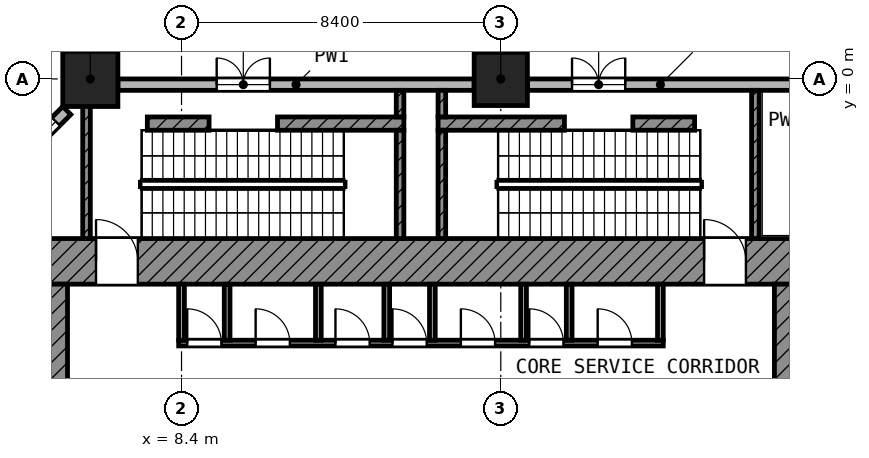
"""IFC4 building model, lengths in metres.
Left out: names, types, materials, properties, quantities, classifications, styles, units other than length and angle.
Written with IfcOpenShell. Run it as: python <this file> out.ifc"""

import sys

from ifc_helpers import new_model, si_unit, direction, frame, frame_2d, origin, origin_2d, place, context, subcontext, project, spatial, rectangle, extrude, element, fill, save


model = new_model("IFC4")
c1 = context("Model", 3, precision=1e-05, world=origin(), true_north=direction((0.0, 1.0)))
c2 = subcontext(c1, "Body", "Model", "MODEL_VIEW")
j1 = project(units=[si_unit("LENGTHUNIT", "METRE"), si_unit("PLANEANGLEUNIT", "RADIAN")], contexts=[c1])
p1 = place(None, origin())
s1 = spatial("IfcSite", under=j1, at=p1, CompositionType="ELEMENT")
p2 = place(p1, origin())
s2 = spatial("IfcBuilding", under=s1, at=p2, CompositionType="ELEMENT")
p3 = place(p2, origin())
s3 = spatial("IfcBuildingStorey", under=s2, at=p3, CompositionType="ELEMENT", Elevation=0.0)
p4 = place(p3, frame((6.0, 0.0, 0.0), z_axis=(0.0, 0.0, 1.0), x_axis=(1.0, 0.0, 0.0)))
e1 = element("IfcColumn", 1, at=p4, inside=s3, PredefinedType="COLUMN", context=c2, shape_type="SweptSolid", body=[
    extrude(rectangle(XDim=1.45, YDim=1.45, at=origin_2d()), origin(), (0.0, 0.0, 1.0), 7.0),
])
p5 = place(p3, frame((16.8, 0.0, 0.0), z_axis=(0.0, 0.0, 1.0), x_axis=(1.0, 0.0, 0.0)))
e2 = element("IfcColumn", 2, at=p5, inside=s3, PredefinedType="COLUMN", context=c2, shape_type="SweptSolid", body=[
    extrude(rectangle(XDim=1.4, YDim=1.4, at=origin_2d()), origin(), (0.0, 0.0, 1.0), 7.0),
])
p6 = place(p3, frame((24.5, -0.15, 0.0), z_axis=(0.0, 0.0, 1.0), x_axis=(-1.0, 0.0, 0.0)))
e3 = element("IfcWall", 3, at=p6, inside=s3, PredefinedType="SOLIDWALL", context=c2, shape_type="SweptSolid", body=[
    extrude(rectangle(XDim=7.0, YDim=0.3, at=frame_2d((3.5, 0.0))), origin(), (0.0, 0.0, 1.0), 5.25),
])
p7 = place(p6, frame((4.425, 0.0, 0.0)))
e4 = element("IfcOpeningElement", 4, at=p7, cuts=e3, PredefinedType="OPENING", context=c2, shape_type="SweptSolid", body=[
    extrude(rectangle(XDim=1.4, YDim=2.1, at=frame_2d((0.7, 1.05))), frame((0.0, 0.16, 0.0), z_axis=(0.0, -1.0, 0.0), x_axis=(1.0, 0.0, 0.0)), (0.0, 0.0, 1.0), 0.32),
])
p8 = place(p3, frame((16.1, -0.15, 0.0), z_axis=(0.0, 0.0, 1.0), x_axis=(-1.0, 0.0, 0.0)))
e5 = element("IfcWall", 5, at=p8, inside=s3, PredefinedType="SOLIDWALL", context=c2, shape_type="SweptSolid", body=[
    extrude(rectangle(XDim=9.375, YDim=0.3, at=frame_2d((4.688, 0.0))), origin(), (0.0, 0.0, 1.0), 5.25),
])
p9 = place(p8, frame((5.375, 0.0, 0.0)))
e6 = element("IfcOpeningElement", 6, at=p9, cuts=e5, PredefinedType="OPENING", context=c2, shape_type="SweptSolid", body=[
    extrude(rectangle(XDim=1.4, YDim=2.1, at=frame_2d((0.7, 1.05))), frame((0.0, 0.16, 0.0), z_axis=(0.0, -1.0, 0.0), x_axis=(1.0, 0.0, 0.0)), (0.0, 0.0, 1.0), 0.32),
])
p10 = place(p3, frame((5.381, -0.831, 0.0), z_axis=(0.0, 0.0, 1.0), x_axis=(-0.707106781187, -0.707106781187, 0.0)))
e7 = element("IfcWall", 7, at=p10, inside=s3, PredefinedType="SOLIDWALL", context=c2, shape_type="SweptSolid", body=[
    extrude(rectangle(XDim=6.435, YDim=0.3, at=frame_2d((3.217, 0.0))), origin(), (0.0, 0.0, 1.0), 5.25),
])
p11 = place(p10, frame((0.409, 0.0, 1.0)))
e8 = element("IfcOpeningElement", 8, at=p11, cuts=e7, PredefinedType="OPENING", context=c2, shape_type="SweptSolid", body=[
    extrude(rectangle(XDim=2.4, YDim=1.8, at=frame_2d((1.2, 0.9))), frame((0.0, 0.16, 0.0), z_axis=(0.0, -1.0, 0.0), x_axis=(1.0, 0.0, 0.0)), (0.0, 0.0, 1.0), 0.32),
])
p12 = place(p10, frame((3.626, 0.0, 1.0)))
e9 = element("IfcOpeningElement", 9, at=p12, cuts=e7, PredefinedType="OPENING", context=c2, shape_type="SweptSolid", body=[
    extrude(rectangle(XDim=2.4, YDim=1.8, at=frame_2d((1.2, 0.9))), frame((0.0, 0.16, 0.0), z_axis=(0.0, -1.0, 0.0), x_axis=(1.0, 0.0, 0.0)), (0.0, 0.0, 1.0), 0.32),
])
p13 = place(p3, frame((4.2, -4.8, 0.0), z_axis=(0.0, 0.0, 1.0), x_axis=(1.0, 0.0, 0.0)))
e10 = element("IfcWall", 10, at=p13, inside=s3, PredefinedType="SHEAR", context=c2, shape_type="SweptSolid", body=[
    extrude(rectangle(XDim=21.0, YDim=1.2, at=frame_2d((10.5, 0.0))), origin(), (0.0, 0.0, 1.0), 6.65),
])
p14 = place(p13, frame((1.95, 0.0, 0.0)))
e11 = element("IfcOpeningElement", 11, at=p14, cuts=e10, PredefinedType="OPENING", context=c2, shape_type="SweptSolid", body=[
    extrude(rectangle(XDim=1.1, YDim=2.1, at=frame_2d((0.55, 1.05))), frame((0.0, 0.61, 0.0), z_axis=(0.0, -1.0, 0.0), x_axis=(1.0, 0.0, 0.0)), (0.0, 0.0, 1.0), 1.22),
])
p15 = place(p13, frame((17.95, 0.0, 0.0)))
e12 = element("IfcOpeningElement", 12, at=p15, cuts=e10, PredefinedType="OPENING", context=c2, shape_type="SweptSolid", body=[
    extrude(rectangle(XDim=1.1, YDim=2.1, at=frame_2d((0.55, 1.05))), frame((0.0, 0.61, 0.0), z_axis=(0.0, -1.0, 0.0), x_axis=(1.0, 0.0, 0.0)), (0.0, 0.0, 1.0), 1.22),
])
p16 = place(p3, frame((4.8, -25.2, 0.0), z_axis=(0.0, 0.0, 1.0), x_axis=(0.0, 1.0, 0.0)))
e13 = element("IfcWall", 13, at=p16, inside=s3, PredefinedType="SHEAR", context=c2, shape_type="SweptSolid", body=[
    extrude(rectangle(XDim=19.8, YDim=1.2, at=frame_2d((9.9, 0.0))), origin(), (0.0, 0.0, 1.0), 6.65),
])
p17 = place(p16, frame((11.65, 0.0, 0.0)))
e14 = element("IfcOpeningElement", 14, at=p17, cuts=e13, PredefinedType="OPENING", context=c2, shape_type="SweptSolid", body=[
    extrude(rectangle(XDim=1.1, YDim=2.1, at=frame_2d((0.55, 1.05))), frame((0.0, 0.61, 0.0), z_axis=(0.0, -1.0, 0.0), x_axis=(1.0, 0.0, 0.0)), (0.0, 0.0, 1.0), 1.22),
])
p18 = place(p16, frame((2.35, 0.0, 0.0)))
e15 = element("IfcOpeningElement", 15, at=p18, cuts=e13, PredefinedType="OPENING", context=c2, shape_type="SweptSolid", body=[
    extrude(rectangle(XDim=1.1, YDim=2.1, at=frame_2d((0.55, 1.05))), frame((0.0, 0.61, 0.0), z_axis=(0.0, -1.0, 0.0), x_axis=(1.0, 0.0, 0.0)), (0.0, 0.0, 1.0), 1.22),
])
p19 = place(p3, frame((24.6, -24.0, 0.0), z_axis=(0.0, 0.0, 1.0), x_axis=(0.0, 1.0, 0.0)))
e16 = element("IfcWall", 16, at=p19, inside=s3, PredefinedType="SHEAR", context=c2, shape_type="SweptSolid", body=[
    extrude(rectangle(XDim=18.6, YDim=1.2, at=frame_2d((9.3, 0.0))), origin(), (0.0, 0.0, 1.0), 6.65),
])
p20 = place(p19, frame((10.5, 0.0, 0.0)))
e17 = element("IfcOpeningElement", 17, at=p20, cuts=e16, PredefinedType="OPENING", context=c2, shape_type="SweptSolid", body=[
    extrude(rectangle(XDim=1.8, YDim=2.1, at=frame_2d((0.9, 1.05))), frame((0.0, 0.61, 0.0), z_axis=(0.0, -1.0, 0.0), x_axis=(1.0, 0.0, 0.0)), (0.0, 0.0, 1.0), 1.22),
])
p21 = place(p3, frame((8.325, -6.95, 0.0), z_axis=(0.0, 0.0, 1.0), x_axis=(1.0, 0.0, 0.0)))
e18 = element("IfcWall", 18, at=p21, inside=s3, PredefinedType="PARTITIONING", context=c2, shape_type="SweptSolid", body=[
    extrude(rectangle(XDim=12.75, YDim=0.15, at=frame_2d((6.375, 0.0))), origin(), (0.0, 0.0, 1.0), 6.65),
])
p22 = place(p21, frame((0.225, 0.0, 0.0)))
e19 = element("IfcOpeningElement", 19, at=p22, cuts=e18, PredefinedType="OPENING", context=c2, shape_type="SweptSolid", body=[
    extrude(rectangle(XDim=0.9, YDim=2.1, at=frame_2d((0.45, 1.05))), frame((0.0, 0.085, 0.0), z_axis=(0.0, -1.0, 0.0), x_axis=(1.0, 0.0, 0.0)), (0.0, 0.0, 1.0), 0.17),
])
p23 = place(p21, frame((2.025, 0.0, 0.0)))
e20 = element("IfcOpeningElement", 20, at=p23, cuts=e18, PredefinedType="OPENING", context=c2, shape_type="SweptSolid", body=[
    extrude(rectangle(XDim=0.9, YDim=2.1, at=frame_2d((0.45, 1.05))), frame((0.0, 0.085, 0.0), z_axis=(0.0, -1.0, 0.0), x_axis=(1.0, 0.0, 0.0)), (0.0, 0.0, 1.0), 0.17),
])
p24 = place(p21, frame((4.125, 0.0, 0.0)))
e21 = element("IfcOpeningElement", 21, at=p24, cuts=e18, PredefinedType="OPENING", context=c2, shape_type="SweptSolid", body=[
    extrude(rectangle(XDim=0.9, YDim=2.1, at=frame_2d((0.45, 1.05))), frame((0.0, 0.085, 0.0), z_axis=(0.0, -1.0, 0.0), x_axis=(1.0, 0.0, 0.0)), (0.0, 0.0, 1.0), 0.17),
])
p25 = place(p21, frame((5.625, 0.0, 0.0)))
e22 = element("IfcOpeningElement", 22, at=p25, cuts=e18, PredefinedType="OPENING", context=c2, shape_type="SweptSolid", body=[
    extrude(rectangle(XDim=0.9, YDim=2.1, at=frame_2d((0.45, 1.05))), frame((0.0, 0.085, 0.0), z_axis=(0.0, -1.0, 0.0), x_axis=(1.0, 0.0, 0.0)), (0.0, 0.0, 1.0), 0.17),
])
p26 = place(p21, frame((7.425, 0.0, 0.0)))
e23 = element("IfcOpeningElement", 23, at=p26, cuts=e18, PredefinedType="OPENING", context=c2, shape_type="SweptSolid", body=[
    extrude(rectangle(XDim=0.9, YDim=2.1, at=frame_2d((0.45, 1.05))), frame((0.0, 0.085, 0.0), z_axis=(0.0, -1.0, 0.0), x_axis=(1.0, 0.0, 0.0)), (0.0, 0.0, 1.0), 0.17),
])
p27 = place(p21, frame((9.225, 0.0, 0.0)))
e24 = element("IfcOpeningElement", 24, at=p27, cuts=e18, PredefinedType="OPENING", context=c2, shape_type="SweptSolid", body=[
    extrude(rectangle(XDim=0.9, YDim=2.1, at=frame_2d((0.45, 1.05))), frame((0.0, 0.085, 0.0), z_axis=(0.0, -1.0, 0.0), x_axis=(1.0, 0.0, 0.0)), (0.0, 0.0, 1.0), 0.17),
])
p28 = place(p21, frame((11.025, 0.0, 0.0)))
e25 = element("IfcOpeningElement", 25, at=p28, cuts=e18, PredefinedType="OPENING", context=c2, shape_type="SweptSolid", body=[
    extrude(rectangle(XDim=0.9, YDim=2.1, at=frame_2d((0.45, 1.05))), frame((0.0, 0.085, 0.0), z_axis=(0.0, -1.0, 0.0), x_axis=(1.0, 0.0, 0.0)), (0.0, 0.0, 1.0), 0.17),
])
for number, where, z_axis, x_axis in (
    (26, (8.4, -6.875, 0.0), (0.0, 0.0, 1.0), (0.0, 1.0, 0.0)),
    (27, (9.6, -6.875, 0.0), (0.0, 0.0, 1.0), (0.0, 1.0, 0.0)),
    (28, (12.0, -6.875, 0.0), (0.0, 0.0, 1.0), (0.0, 1.0, 0.0)),
    (29, (13.8, -6.875, 0.0), (0.0, 0.0, 1.0), (0.0, 1.0, 0.0)),
    (30, (15.0, -6.875, 0.0), (0.0, 0.0, 1.0), (0.0, 1.0, 0.0)),
    (31, (17.4, -6.875, 0.0), (0.0, 0.0, 1.0), (0.0, 1.0, 0.0)),
    (32, (18.6, -6.875, 0.0), (0.0, 0.0, 1.0), (0.0, 1.0, 0.0)),
    (33, (21.0, -6.875, 0.0), (0.0, 0.0, 1.0), (0.0, 1.0, 0.0)),
):
    element("IfcWall", number, at=place(p3, frame(where, z_axis=z_axis, x_axis=x_axis)), inside=s3, PredefinedType="PARTITIONING", context=c2, shape_type="SweptSolid", body=[
        extrude(rectangle(XDim=1.475, YDim=0.15, at=frame_2d((0.738, 0.0))), origin(), (0.0, 0.0, 1.0), 6.65),
    ])
p29 = place(p3, frame((10.925, -1.175, 0.0), z_axis=(0.0, 0.0, 1.0), x_axis=(1.0, 0.0, 0.0)))
e34 = element("IfcWall", 34, at=p29, inside=s3, PredefinedType="SHEAR", context=c2, shape_type="SweptSolid", body=[
    extrude(rectangle(XDim=3.325, YDim=0.35, at=frame_2d((1.663, 0.0))), origin(), (0.0, 0.0, 1.0), 6.65),
])
p30 = place(p3, frame((7.5, -1.175, 0.0), z_axis=(0.0, 0.0, 1.0), x_axis=(1.0, 0.0, 0.0)))
e35 = element("IfcWall", 35, at=p30, inside=s3, PredefinedType="SHEAR", context=c2, shape_type="SweptSolid", body=[
    extrude(rectangle(XDim=1.625, YDim=0.35, at=frame_2d((0.812, 0.0))), origin(), (0.0, 0.0, 1.0), 6.65),
])
p31 = place(p3, frame((5.9, -4.2, 0.0), z_axis=(0.0, 0.0, 1.0), x_axis=(0.0, 1.0, 0.0)))
e36 = element("IfcWall", 36, at=p31, inside=s3, PredefinedType="SHEAR", context=c2, shape_type="SweptSolid", body=[
    extrude(rectangle(XDim=3.9, YDim=0.2, at=frame_2d((1.95, 0.0))), origin(), (0.0, 0.0, 1.0), 6.65),
])
p32 = place(p3, frame((14.15, -4.2, 0.0), z_axis=(0.0, 0.0, 1.0), x_axis=(0.0, 1.0, 0.0)))
e37 = element("IfcWall", 37, at=p32, inside=s3, PredefinedType="SHEAR", context=c2, shape_type="SweptSolid", body=[
    extrude(rectangle(XDim=2.85, YDim=0.2, at=frame_2d((1.425, 0.0))), origin(), (0.0, 0.0, 1.0), 6.65),
])
p33 = place(p3, frame((14.15, -1.0, 0.0), z_axis=(0.0, 0.0, 1.0), x_axis=(0.0, 1.0, 0.0)))
e38 = element("IfcWall", 38, at=p33, inside=s3, PredefinedType="SHEAR", context=c2, shape_type="SweptSolid", body=[
    extrude(rectangle(XDim=0.7, YDim=0.2, at=frame_2d((0.35, 0.0))), origin(), (0.0, 0.0, 1.0), 6.65),
])
p34 = place(p3, frame((15.15, -1.175, 0.0), z_axis=(0.0, 0.0, 1.0), x_axis=(1.0, 0.0, 0.0)))
e39 = element("IfcWall", 39, at=p34, inside=s3, PredefinedType="SHEAR", context=c2, shape_type="SweptSolid", body=[
    extrude(rectangle(XDim=3.325, YDim=0.35, at=frame_2d((1.663, 0.0))), origin(), (0.0, 0.0, 1.0), 6.65),
])
p35 = place(p3, frame((20.275, -1.175, 0.0), z_axis=(0.0, 0.0, 1.0), x_axis=(1.0, 0.0, 0.0)))
e40 = element("IfcWall", 40, at=p35, inside=s3, PredefinedType="SHEAR", context=c2, shape_type="SweptSolid", body=[
    extrude(rectangle(XDim=1.625, YDim=0.35, at=frame_2d((0.812, 0.0))), origin(), (0.0, 0.0, 1.0), 6.65),
])
p36 = place(p3, frame((15.25, -4.2, 0.0), z_axis=(0.0, 0.0, 1.0), x_axis=(0.0, 1.0, 0.0)))
e41 = element("IfcWall", 41, at=p36, inside=s3, PredefinedType="SHEAR", context=c2, shape_type="SweptSolid", body=[
    extrude(rectangle(XDim=2.85, YDim=0.2, at=frame_2d((1.425, 0.0))), origin(), (0.0, 0.0, 1.0), 6.65),
])
p37 = place(p3, frame((15.25, -1.0, 0.0), z_axis=(0.0, 0.0, 1.0), x_axis=(0.0, 1.0, 0.0)))
e42 = element("IfcWall", 42, at=p37, inside=s3, PredefinedType="SHEAR", context=c2, shape_type="SweptSolid", body=[
    extrude(rectangle(XDim=0.7, YDim=0.2, at=frame_2d((0.35, 0.0))), origin(), (0.0, 0.0, 1.0), 6.65),
])
p38 = place(p3, frame((23.5, -4.2, 0.0), z_axis=(0.0, 0.0, 1.0), x_axis=(0.0, 1.0, 0.0)))
e43 = element("IfcWall", 43, at=p38, inside=s3, PredefinedType="SHEAR", context=c2, shape_type="SweptSolid", body=[
    extrude(rectangle(XDim=3.9, YDim=0.2, at=frame_2d((1.95, 0.0))), origin(), (0.0, 0.0, 1.0), 6.65),
])
p39 = place(p7, frame((1.4, 0.0, 0.0), z_axis=(0.0, 0.0, 1.0), x_axis=(-1.0, 0.0, 0.0)))
e44 = element("IfcDoor", 44, at=p39, inside=s3, OperationType="DOUBLE_DOOR_SINGLE_SWING", PredefinedType="DOOR", context=c2, shape_type="SweptSolid", body=[
    extrude(rectangle(XDim=1.4, YDim=2.1, at=frame_2d((0.7, 1.05))), frame((0.0, 0.025, 0.0), z_axis=(0.0, -1.0, 0.0), x_axis=(1.0, 0.0, 0.0)), (0.0, 0.0, 1.0), 0.05),
])
fill(e4, e44)
p40 = place(p9, frame((1.4, 0.0, 0.0), z_axis=(0.0, 0.0, 1.0), x_axis=(-1.0, 0.0, 0.0)))
e45 = element("IfcDoor", 45, at=p40, inside=s3, OperationType="DOUBLE_DOOR_SINGLE_SWING", PredefinedType="DOOR", context=c2, shape_type="SweptSolid", body=[
    extrude(rectangle(XDim=1.4, YDim=2.1, at=frame_2d((0.7, 1.05))), frame((0.0, 0.025, 0.0), z_axis=(0.0, -1.0, 0.0), x_axis=(1.0, 0.0, 0.0)), (0.0, 0.0, 1.0), 0.05),
])
fill(e6, e45)
p41 = place(p11, origin())
e46 = element("IfcWindow", 46, at=p41, inside=s3, PartitioningType="SINGLE_PANEL", PredefinedType="WINDOW", context=c2, shape_type="SweptSolid", body=[
    extrude(rectangle(XDim=2.4, YDim=1.8, at=frame_2d((1.2, 0.9))), frame((0.0, 0.03, 0.0), z_axis=(0.0, -1.0, 0.0), x_axis=(1.0, 0.0, 0.0)), (0.0, 0.0, 1.0), 0.06),
])
fill(e8, e46)
p42 = place(p14, origin())
e47 = element("IfcDoor", 47, at=p42, inside=s3, OperationType="SINGLE_SWING_LEFT", PredefinedType="DOOR", context=c2, shape_type="SweptSolid", body=[
    extrude(rectangle(XDim=1.1, YDim=2.1, at=frame_2d((0.55, 1.05))), frame((0.0, 0.025, 0.0), z_axis=(0.0, -1.0, 0.0), x_axis=(1.0, 0.0, 0.0)), (0.0, 0.0, 1.0), 0.05),
])
fill(e11, e47)
p43 = place(p15, origin())
e48 = element("IfcDoor", 48, at=p43, inside=s3, OperationType="SINGLE_SWING_LEFT", PredefinedType="DOOR", context=c2, shape_type="SweptSolid", body=[
    extrude(rectangle(XDim=1.1, YDim=2.1, at=frame_2d((0.55, 1.05))), frame((0.0, 0.025, 0.0), z_axis=(0.0, -1.0, 0.0), x_axis=(1.0, 0.0, 0.0)), (0.0, 0.0, 1.0), 0.05),
])
fill(e12, e48)
p44 = place(p22, origin())
e49 = element("IfcDoor", 49, at=p44, inside=s3, OperationType="SINGLE_SWING_LEFT", PredefinedType="DOOR", context=c2, shape_type="SweptSolid", body=[
    extrude(rectangle(XDim=0.9, YDim=2.1, at=frame_2d((0.45, 1.05))), frame((0.0, 0.025, 0.0), z_axis=(0.0, -1.0, 0.0), x_axis=(1.0, 0.0, 0.0)), (0.0, 0.0, 1.0), 0.05),
])
fill(e19, e49)
p45 = place(p23, origin())
e50 = element("IfcDoor", 50, at=p45, inside=s3, OperationType="SINGLE_SWING_LEFT", PredefinedType="DOOR", context=c2, shape_type="SweptSolid", body=[
    extrude(rectangle(XDim=0.9, YDim=2.1, at=frame_2d((0.45, 1.05))), frame((0.0, 0.025, 0.0), z_axis=(0.0, -1.0, 0.0), x_axis=(1.0, 0.0, 0.0)), (0.0, 0.0, 1.0), 0.05),
])
fill(e20, e50)
p46 = place(p24, origin())
e51 = element("IfcDoor", 51, at=p46, inside=s3, OperationType="SINGLE_SWING_LEFT", PredefinedType="DOOR", context=c2, shape_type="SweptSolid", body=[
    extrude(rectangle(XDim=0.9, YDim=2.1, at=frame_2d((0.45, 1.05))), frame((0.0, 0.025, 0.0), z_axis=(0.0, -1.0, 0.0), x_axis=(1.0, 0.0, 0.0)), (0.0, 0.0, 1.0), 0.05),
])
fill(e21, e51)
p47 = place(p25, origin())
e52 = element("IfcDoor", 52, at=p47, inside=s3, OperationType="SINGLE_SWING_LEFT", PredefinedType="DOOR", context=c2, shape_type="SweptSolid", body=[
    extrude(rectangle(XDim=0.9, YDim=2.1, at=frame_2d((0.45, 1.05))), frame((0.0, 0.025, 0.0), z_axis=(0.0, -1.0, 0.0), x_axis=(1.0, 0.0, 0.0)), (0.0, 0.0, 1.0), 0.05),
])
fill(e22, e52)
p48 = place(p26, origin())
e53 = element("IfcDoor", 53, at=p48, inside=s3, OperationType="SINGLE_SWING_LEFT", PredefinedType="DOOR", context=c2, shape_type="SweptSolid", body=[
    extrude(rectangle(XDim=0.9, YDim=2.1, at=frame_2d((0.45, 1.05))), frame((0.0, 0.025, 0.0), z_axis=(0.0, -1.0, 0.0), x_axis=(1.0, 0.0, 0.0)), (0.0, 0.0, 1.0), 0.05),
])
fill(e23, e53)
p49 = place(p27, origin())
e54 = element("IfcDoor", 54, at=p49, inside=s3, OperationType="SINGLE_SWING_LEFT", PredefinedType="DOOR", context=c2, shape_type="SweptSolid", body=[
    extrude(rectangle(XDim=0.9, YDim=2.1, at=frame_2d((0.45, 1.05))), frame((0.0, 0.025, 0.0), z_axis=(0.0, -1.0, 0.0), x_axis=(1.0, 0.0, 0.0)), (0.0, 0.0, 1.0), 0.05),
])
fill(e24, e54)
p50 = place(p28, origin())
e55 = element("IfcDoor", 55, at=p50, inside=s3, OperationType="SINGLE_SWING_LEFT", PredefinedType="DOOR", context=c2, shape_type="SweptSolid", body=[
    extrude(rectangle(XDim=0.9, YDim=2.1, at=frame_2d((0.45, 1.05))), frame((0.0, 0.025, 0.0), z_axis=(0.0, -1.0, 0.0), x_axis=(1.0, 0.0, 0.0)), (0.0, 0.0, 1.0), 0.05),
])
fill(e25, e55)
save(model, sys.argv[1])
